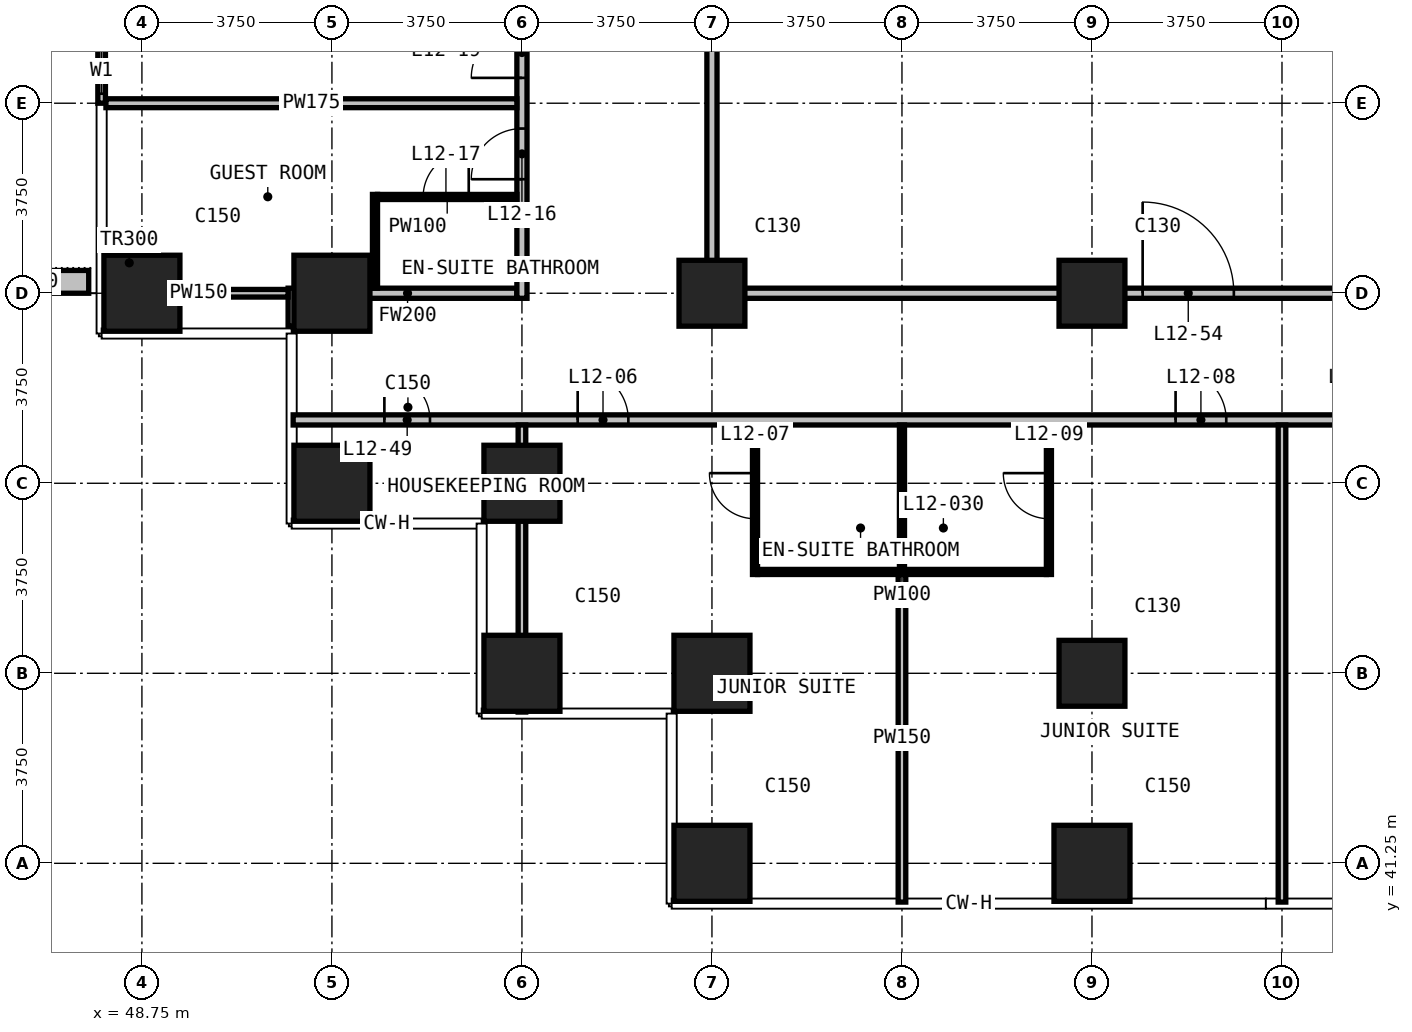
"""IFC4 building model, lengths in metres.
Left out: names, types, materials, properties, quantities, classifications, styles, units other than length and angle.
Written with IfcOpenShell. Run it as: python <this file> out.ifc"""

import sys

from ifc_helpers import new_model, si_unit, direction, frame, frame_2d, origin, origin_2d, place, context, subcontext, project, spatial, rectangle, extrude, element, fill, save


model = new_model("IFC4")
c1 = context("Model", 3, precision=1e-05, world=origin(), true_north=direction((0.0, 1.0)))
c2 = subcontext(c1, "Body", "Model", "MODEL_VIEW")
j1 = project(units=[si_unit("LENGTHUNIT", "METRE"), si_unit("PLANEANGLEUNIT", "RADIAN")], contexts=[c1])
p1 = place(None, origin())
s1 = spatial("IfcSite", under=j1, at=p1, CompositionType="ELEMENT")
p2 = place(p1, origin())
s2 = spatial("IfcBuilding", under=s1, at=p2, CompositionType="ELEMENT")
p3 = place(p2, frame((0.0, 0.0, 59.3)))
s3 = spatial("IfcBuildingStorey", under=s2, at=p3, CompositionType="ELEMENT", Elevation=59.3)
for number, where, z_axis, x_axis in (
    (1, (48.75, 52.5, 0.0), (0.0, 0.0, 1.0), (1.0, 0.0, 0.0)),
    (2, (52.5, 48.75, 0.0), (0.0, 0.0, 1.0), (1.0, 0.0, 0.0)),
    (3, (52.5, 52.5, 0.0), (0.0, 0.0, 1.0), (1.0, 0.0, 0.0)),
    (4, (56.25, 45.0, 0.0), (0.0, 0.0, 1.0), (1.0, 0.0, 0.0)),
    (5, (56.25, 48.75, 0.0), (0.0, 0.0, 1.0), (1.0, 0.0, 0.0)),
    (6, (60.0, 41.25, 0.0), (0.0, 0.0, 1.0), (1.0, 0.0, 0.0)),
    (7, (60.0, 45.0, 0.0), (0.0, 0.0, 1.0), (1.0, 0.0, 0.0)),
):
    element("IfcColumn", number, at=place(p3, frame(where, z_axis=z_axis, x_axis=x_axis)), inside=s3, PredefinedType="COLUMN", context=c2, shape_type="SweptSolid", body=[
        extrude(rectangle(XDim=1.5, YDim=1.5, at=origin_2d()), origin(), (0.0, 0.0, 1.0), 3.3),
    ])
p4 = place(p3, frame((60.0, 52.5, 0.0), z_axis=(0.0, 0.0, 1.0), x_axis=(1.0, 0.0, 0.0)))
e8 = element("IfcColumn", 8, at=p4, inside=s3, PredefinedType="COLUMN", context=c2, shape_type="SweptSolid", body=[
    extrude(rectangle(XDim=1.3, YDim=1.3, at=origin_2d()), origin(), (0.0, 0.0, 1.0), 3.3),
])
p5 = place(p3, frame((67.5, 41.25, 0.0), z_axis=(0.0, 0.0, 1.0), x_axis=(1.0, 0.0, 0.0)))
e9 = element("IfcColumn", 9, at=p5, inside=s3, PredefinedType="COLUMN", context=c2, shape_type="SweptSolid", body=[
    extrude(rectangle(XDim=1.5, YDim=1.5, at=origin_2d()), origin(), (0.0, 0.0, 1.0), 3.3),
])
for number, where, z_axis, x_axis in (
    (10, (67.5, 45.0, 0.0), (0.0, 0.0, 1.0), (1.0, 0.0, 0.0)),
    (11, (67.5, 52.5, 0.0), (0.0, 0.0, 1.0), (1.0, 0.0, 0.0)),
):
    element("IfcColumn", number, at=place(p3, frame(where, z_axis=z_axis, x_axis=x_axis)), inside=s3, PredefinedType="COLUMN", context=c2, shape_type="SweptSolid", body=[
        extrude(rectangle(XDim=1.3, YDim=1.3, at=origin_2d()), origin(), (0.0, 0.0, 1.0), 3.3),
    ])
p6 = place(p3, frame((47.955, 56.25, 0.0), z_axis=(0.0, 0.0, 1.0), x_axis=(0.0, 1.0, 0.0)))
e12 = element("IfcWall", 12, at=p6, inside=s3, PredefinedType="SOLIDWALL", context=c2, shape_type="SweptSolid", body=[
    extrude(rectangle(XDim=3.75, YDim=0.15, at=frame_2d((1.875, 0.0))), origin(), (0.0, 0.0, 1.0), 3.0),
])
p7 = place(p6, frame((0.188, 0.0, 0.1)))
e13 = element("IfcOpeningElement", 13, at=p7, cuts=e12, PredefinedType="OPENING", context=c2, shape_type="SweptSolid", body=[
    extrude(rectangle(XDim=0.9, YDim=2.4, at=frame_2d((0.45, 1.2))), frame((0.0, 0.085, 0.0), z_axis=(0.0, -1.0, 0.0), x_axis=(1.0, 0.0, 0.0)), (0.0, 0.0, 1.0), 0.17),
])
p8 = place(p6, frame((1.275, 0.0, 0.0)))
e14 = element("IfcOpeningElement", 14, at=p8, cuts=e12, PredefinedType="OPENING", context=c2, shape_type="SweptSolid", body=[
    extrude(rectangle(XDim=1.2, YDim=2.4, at=frame_2d((0.6, 1.2))), frame((0.0, 0.085, 0.0), z_axis=(0.0, -1.0, 0.0), x_axis=(1.0, 0.0, 0.0)), (0.0, 0.0, 1.0), 0.17),
])
p9 = place(p3, frame((47.7, 52.725, 0.0), z_axis=(0.0, 0.0, 1.0), x_axis=(-1.0, 0.0, 0.0)))
e15 = element("IfcWall", 15, at=p9, inside=s3, PredefinedType="USERDEFINED", context=c2, shape_type="SweptSolid", body=[
    extrude(rectangle(XDim=2.35, YDim=0.45, at=frame_2d((1.175, 0.0))), origin(), (0.0, 0.0, 1.0), 1.1),
])
p10 = place(p3, frame((51.735, 50.0, 0.0), z_axis=(0.0, 0.0, 1.0), x_axis=(1.0, 0.0, 0.0)))
e16 = element("IfcWall", 16, at=p10, inside=s3, PredefinedType="PARTITIONING", context=c2, shape_type="SweptSolid", body=[
    extrude(rectangle(XDim=46.53, YDim=0.2, at=frame_2d((23.265, 0.0))), origin(), (0.0, 0.0, 1.0), 3.0),
])
p11 = place(p10, frame((5.615, 0.0, 0.0)))
e17 = element("IfcOpeningElement", 17, at=p11, cuts=e16, PredefinedType="OPENING", context=c2, shape_type="SweptSolid", body=[
    extrude(rectangle(XDim=1.0, YDim=2.2, at=frame_2d((0.5, 1.1))), frame((0.0, 0.11, 0.0), z_axis=(0.0, -1.0, 0.0), x_axis=(1.0, 0.0, 0.0)), (0.0, 0.0, 1.0), 0.22),
])
p12 = place(p10, frame((17.415, 0.0, 0.0)))
e18 = element("IfcOpeningElement", 18, at=p12, cuts=e16, PredefinedType="OPENING", context=c2, shape_type="SweptSolid", body=[
    extrude(rectangle(XDim=1.0, YDim=2.2, at=frame_2d((0.5, 1.1))), frame((0.0, 0.11, 0.0), z_axis=(0.0, -1.0, 0.0), x_axis=(1.0, 0.0, 0.0)), (0.0, 0.0, 1.0), 0.22),
])
p13 = place(p10, frame((20.615, 0.0, 0.0)))
e19 = element("IfcOpeningElement", 19, at=p13, cuts=e16, PredefinedType="OPENING", context=c2, shape_type="SweptSolid", body=[
    extrude(rectangle(XDim=1.0, YDim=2.2, at=frame_2d((0.5, 1.1))), frame((0.0, 0.11, 0.0), z_axis=(0.0, -1.0, 0.0), x_axis=(1.0, 0.0, 0.0)), (0.0, 0.0, 1.0), 0.22),
])
p14 = place(p10, frame((32.415, 0.0, 0.0)))
e20 = element("IfcOpeningElement", 20, at=p14, cuts=e16, PredefinedType="OPENING", context=c2, shape_type="SweptSolid", body=[
    extrude(rectangle(XDim=1.0, YDim=2.2, at=frame_2d((0.5, 1.1))), frame((0.0, 0.11, 0.0), z_axis=(0.0, -1.0, 0.0), x_axis=(1.0, 0.0, 0.0)), (0.0, 0.0, 1.0), 0.22),
])
p15 = place(p10, frame((35.615, 0.0, 0.0)))
e21 = element("IfcOpeningElement", 21, at=p15, cuts=e16, PredefinedType="OPENING", context=c2, shape_type="SweptSolid", body=[
    extrude(rectangle(XDim=1.0, YDim=2.2, at=frame_2d((0.5, 1.1))), frame((0.0, 0.11, 0.0), z_axis=(0.0, -1.0, 0.0), x_axis=(1.0, 0.0, 0.0)), (0.0, 0.0, 1.0), 0.22),
])
p16 = place(p10, frame((1.8, 0.0, 0.0)))
e22 = element("IfcOpeningElement", 22, at=p16, cuts=e16, PredefinedType="OPENING", context=c2, shape_type="SweptSolid", body=[
    extrude(rectangle(XDim=0.9, YDim=2.2, at=frame_2d((0.45, 1.1))), frame((0.0, 0.11, 0.0), z_axis=(0.0, -1.0, 0.0), x_axis=(1.0, 0.0, 0.0)), (0.0, 0.0, 1.0), 0.22),
])
p17 = place(p10, frame((43.815, 0.0, 0.0)))
e23 = element("IfcOpeningElement", 23, at=p17, cuts=e16, PredefinedType="OPENING", context=c2, shape_type="SweptSolid", body=[
    extrude(rectangle(XDim=0.9, YDim=2.2, at=frame_2d((0.45, 1.1))), frame((0.0, 0.11, 0.0), z_axis=(0.0, -1.0, 0.0), x_axis=(1.0, 0.0, 0.0)), (0.0, 0.0, 1.0), 0.22),
])
p18 = place(p3, frame((51.835, 52.5, 0.0), z_axis=(0.0, 0.0, 1.0), x_axis=(1.0, 0.0, 0.0)))
e24 = element("IfcWall", 24, at=p18, inside=s3, PredefinedType="PARTITIONING", context=c2, shape_type="SweptSolid", body=[
    extrude(rectangle(XDim=4.315, YDim=0.2, at=frame_2d((2.157, 0.0))), origin(), (0.0, 0.0, 1.0), 3.0),
])
p19 = place(p3, frame((60.1, 52.5, 0.0), z_axis=(0.0, 0.0, 1.0), x_axis=(1.0, 0.0, 0.0)))
e25 = element("IfcWall", 25, at=p19, inside=s3, PredefinedType="PARTITIONING", context=c2, shape_type="SweptSolid", body=[
    extrude(rectangle(XDim=29.8, YDim=0.2, at=frame_2d((14.9, 0.0))), origin(), (0.0, 0.0, 1.0), 3.0),
])
p20 = place(p19, frame((8.4, 0.0, 0.0)))
e26 = element("IfcOpeningElement", 26, at=p20, cuts=e25, PredefinedType="OPENING", context=c2, shape_type="SweptSolid", body=[
    extrude(rectangle(XDim=1.8, YDim=2.2, at=frame_2d((0.9, 1.1))), frame((0.0, 0.11, 0.0), z_axis=(0.0, -1.0, 0.0), x_axis=(1.0, 0.0, 0.0)), (0.0, 0.0, 1.0), 0.22),
])
p21 = place(p19, frame((23.75, 0.0, 0.0)))
e27 = element("IfcOpeningElement", 27, at=p21, cuts=e25, PredefinedType="OPENING", context=c2, shape_type="SweptSolid", body=[
    extrude(rectangle(XDim=0.9, YDim=2.2, at=frame_2d((0.45, 1.1))), frame((0.0, 0.11, 0.0), z_axis=(0.0, -1.0, 0.0), x_axis=(1.0, 0.0, 0.0)), (0.0, 0.0, 1.0), 0.22),
])
p22 = place(p3, frame((51.735, 51.855, 0.0), z_axis=(0.0, 0.0, 1.0), x_axis=(0.0, 1.0, 0.0)))
e28 = element("IfcWall", 28, at=p22, inside=s3, PredefinedType="PARTITIONING", context=c2, shape_type="SweptSolid", body=[
    extrude(rectangle(XDim=0.745, YDim=0.2, at=frame_2d((0.373, 0.0))), origin(), (0.0, 0.0, 1.0), 3.0),
])
p23 = place(p3, frame((56.25, 52.4, 0.0), z_axis=(0.0, 0.0, 1.0), x_axis=(0.0, 1.0, 0.0)))
e29 = element("IfcWall", 29, at=p23, inside=s3, PredefinedType="PARTITIONING", context=c2, shape_type="SweptSolid", body=[
    extrude(rectangle(XDim=38.31, YDim=0.2, at=frame_2d((19.155, 0.0))), origin(), (0.0, 0.0, 1.0), 3.0),
])
p24 = place(p23, frame((2.35, 0.0, 0.0)))
e30 = element("IfcOpeningElement", 30, at=p24, cuts=e29, PredefinedType="OPENING", context=c2, shape_type="SweptSolid", body=[
    extrude(rectangle(XDim=1.0, YDim=2.2, at=frame_2d((0.5, 1.1))), frame((0.0, 0.11, 0.0), z_axis=(0.0, -1.0, 0.0), x_axis=(1.0, 0.0, 0.0)), (0.0, 0.0, 1.0), 0.22),
])
p25 = place(p23, frame((4.35, 0.0, 0.0)))
e31 = element("IfcOpeningElement", 31, at=p25, cuts=e29, PredefinedType="OPENING", context=c2, shape_type="SweptSolid", body=[
    extrude(rectangle(XDim=1.0, YDim=2.2, at=frame_2d((0.5, 1.1))), frame((0.0, 0.11, 0.0), z_axis=(0.0, -1.0, 0.0), x_axis=(1.0, 0.0, 0.0)), (0.0, 0.0, 1.0), 0.22),
])
p26 = place(p23, frame((13.0, 0.0, 0.0)))
e32 = element("IfcOpeningElement", 32, at=p26, cuts=e29, PredefinedType="OPENING", context=c2, shape_type="SweptSolid", body=[
    extrude(rectangle(XDim=1.0, YDim=2.2, at=frame_2d((0.5, 1.1))), frame((0.0, 0.11, 0.0), z_axis=(0.0, -1.0, 0.0), x_axis=(1.0, 0.0, 0.0)), (0.0, 0.0, 1.0), 0.22),
])
p27 = place(p23, frame((15.6, 0.0, 0.0)))
e33 = element("IfcOpeningElement", 33, at=p27, cuts=e29, PredefinedType="OPENING", context=c2, shape_type="SweptSolid", body=[
    extrude(rectangle(XDim=1.0, YDim=2.2, at=frame_2d((0.5, 1.1))), frame((0.0, 0.11, 0.0), z_axis=(0.0, -1.0, 0.0), x_axis=(1.0, 0.0, 0.0)), (0.0, 0.0, 1.0), 0.22),
])
p28 = place(p23, frame((21.1, 0.0, 0.0)))
e34 = element("IfcOpeningElement", 34, at=p28, cuts=e29, PredefinedType="OPENING", context=c2, shape_type="SweptSolid", body=[
    extrude(rectangle(XDim=1.0, YDim=2.2, at=frame_2d((0.5, 1.1))), frame((0.0, 0.11, 0.0), z_axis=(0.0, -1.0, 0.0), x_axis=(1.0, 0.0, 0.0)), (0.0, 0.0, 1.0), 0.22),
])
p29 = place(p23, frame((23.7, 0.0, 0.0)))
e35 = element("IfcOpeningElement", 35, at=p29, cuts=e29, PredefinedType="OPENING", context=c2, shape_type="SweptSolid", body=[
    extrude(rectangle(XDim=1.0, YDim=2.2, at=frame_2d((0.5, 1.1))), frame((0.0, 0.11, 0.0), z_axis=(0.0, -1.0, 0.0), x_axis=(1.0, 0.0, 0.0)), (0.0, 0.0, 1.0), 0.22),
])
p30 = place(p23, frame((31.55, 0.0, 0.0)))
e36 = element("IfcOpeningElement", 36, at=p30, cuts=e29, PredefinedType="OPENING", context=c2, shape_type="SweptSolid", body=[
    extrude(rectangle(XDim=0.9, YDim=2.2, at=frame_2d((0.45, 1.1))), frame((0.0, 0.11, 0.0), z_axis=(0.0, -1.0, 0.0), x_axis=(1.0, 0.0, 0.0)), (0.0, 0.0, 1.0), 0.22),
])
p31 = place(p23, frame((35.65, 0.0, 0.0)))
e37 = element("IfcOpeningElement", 37, at=p31, cuts=e29, PredefinedType="OPENING", context=c2, shape_type="SweptSolid", body=[
    extrude(rectangle(XDim=0.9, YDim=2.2, at=frame_2d((0.45, 1.1))), frame((0.0, 0.11, 0.0), z_axis=(0.0, -1.0, 0.0), x_axis=(1.0, 0.0, 0.0)), (0.0, 0.0, 1.0), 0.22),
])
p32 = place(p3, frame((60.0, 52.4, 0.0), z_axis=(0.0, 0.0, 1.0), x_axis=(0.0, 1.0, 0.0)))
e38 = element("IfcWall", 38, at=p32, inside=s3, PredefinedType="PARTITIONING", context=c2, shape_type="SweptSolid", body=[
    extrude(rectangle(XDim=18.84, YDim=0.2, at=frame_2d((9.42, 0.0))), origin(), (0.0, 0.0, 1.0), 3.0),
])
p33 = place(p32, frame((13.45, 0.0, 0.0)))
e39 = element("IfcOpeningElement", 39, at=p33, cuts=e38, PredefinedType="OPENING", context=c2, shape_type="SweptSolid", body=[
    extrude(rectangle(XDim=1.0, YDim=2.2, at=frame_2d((0.5, 1.1))), frame((0.0, 0.11, 0.0), z_axis=(0.0, -1.0, 0.0), x_axis=(1.0, 0.0, 0.0)), (0.0, 0.0, 1.0), 0.22),
])
p34 = place(p3, frame((48.04, 56.25, 0.0), z_axis=(0.0, 0.0, 1.0), x_axis=(1.0, 0.0, 0.0)))
e40 = element("IfcWall", 40, at=p34, inside=s3, PredefinedType="PARTITIONING", context=c2, shape_type="SweptSolid", body=[
    extrude(rectangle(XDim=8.11, YDim=0.175, at=frame_2d((4.055, 0.0))), origin(), (0.0, 0.0, 1.0), 3.0),
])
p35 = place(p3, frame((48.105, 52.5, 0.0), z_axis=(0.0, 0.0, 1.0), x_axis=(1.0, 0.0, 0.0)))
e41 = element("IfcWall", 41, at=p35, inside=s3, PredefinedType="PARTITIONING", context=c2, shape_type="SweptSolid", body=[
    extrude(rectangle(XDim=3.53, YDim=0.15, at=frame_2d((1.765, 0.0))), origin(), (0.0, 0.0, 1.0), 3.0),
])
p36 = place(p3, frame((56.25, 44.235, 0.0), z_axis=(0.0, 0.0, 1.0), x_axis=(0.0, 1.0, 0.0)))
e42 = element("IfcWall", 42, at=p36, inside=s3, PredefinedType="PARTITIONING", context=c2, shape_type="SweptSolid", body=[
    extrude(rectangle(XDim=5.665, YDim=0.15, at=frame_2d((2.833, 0.0))), origin(), (0.0, 0.0, 1.0), 3.0),
])
p37 = place(p3, frame((63.75, 40.485, 0.0), z_axis=(0.0, 0.0, 1.0), x_axis=(0.0, 1.0, 0.0)))
e43 = element("IfcWall", 43, at=p37, inside=s3, PredefinedType="PARTITIONING", context=c2, shape_type="SweptSolid", body=[
    extrude(rectangle(XDim=6.465, YDim=0.15, at=frame_2d((3.232, 0.0))), origin(), (0.0, 0.0, 1.0), 3.0),
])
p38 = place(p3, frame((71.25, 40.485, 0.0), z_axis=(0.0, 0.0, 1.0), x_axis=(0.0, 1.0, 0.0)))
e44 = element("IfcWall", 44, at=p38, inside=s3, PredefinedType="PARTITIONING", context=c2, shape_type="SweptSolid", body=[
    extrude(rectangle(XDim=9.415, YDim=0.15, at=frame_2d((4.708, 0.0))), origin(), (0.0, 0.0, 1.0), 3.0),
])
p39 = place(p3, frame((60.9, 47.0, 0.0), z_axis=(0.0, 0.0, 1.0), x_axis=(1.0, 0.0, 0.0)))
e45 = element("IfcWall", 45, at=p39, inside=s3, PredefinedType="PARTITIONING", context=c2, shape_type="SweptSolid", body=[
    extrude(rectangle(XDim=5.7, YDim=0.1, at=frame_2d((2.85, 0.0))), origin(), (0.0, 0.0, 1.0), 3.0),
])
p40 = place(p3, frame((53.4, 54.4, 0.0), z_axis=(0.0, 0.0, 1.0), x_axis=(1.0, 0.0, 0.0)))
e46 = element("IfcWall", 46, at=p40, inside=s3, PredefinedType="PARTITIONING", context=c2, shape_type="SweptSolid", body=[
    extrude(rectangle(XDim=2.75, YDim=0.1, at=frame_2d((1.375, 0.0))), origin(), (0.0, 0.0, 1.0), 3.0),
])
p41 = place(p40, frame((0.9, 0.0, 0.0)))
e47 = element("IfcOpeningElement", 47, at=p41, cuts=e46, PredefinedType="OPENING", context=c2, shape_type="SweptSolid", body=[
    extrude(rectangle(XDim=0.9, YDim=2.2, at=frame_2d((0.45, 1.1))), frame((0.0, 0.06, 0.0), z_axis=(0.0, -1.0, 0.0), x_axis=(1.0, 0.0, 0.0)), (0.0, 0.0, 1.0), 0.12),
])
p42 = place(p3, frame((53.35, 52.6, 0.0), z_axis=(0.0, 0.0, 1.0), x_axis=(0.0, 1.0, 0.0)))
e48 = element("IfcWall", 48, at=p42, inside=s3, PredefinedType="PARTITIONING", context=c2, shape_type="SweptSolid", body=[
    extrude(rectangle(XDim=1.85, YDim=0.1, at=frame_2d((0.925, 0.0))), origin(), (0.0, 0.0, 1.0), 3.0),
])
p43 = place(p3, frame((60.85, 46.95, 0.0), z_axis=(0.0, 0.0, 1.0), x_axis=(0.0, 1.0, 0.0)))
e49 = element("IfcWall", 49, at=p43, inside=s3, PredefinedType="PARTITIONING", context=c2, shape_type="SweptSolid", body=[
    extrude(rectangle(XDim=2.95, YDim=0.1, at=frame_2d((1.475, 0.0))), origin(), (0.0, 0.0, 1.0), 3.0),
])
p44 = place(p43, frame((1.1, 0.0, 0.0)))
e50 = element("IfcOpeningElement", 50, at=p44, cuts=e49, PredefinedType="OPENING", context=c2, shape_type="SweptSolid", body=[
    extrude(rectangle(XDim=0.9, YDim=2.2, at=frame_2d((0.45, 1.1))), frame((0.0, 0.06, 0.0), z_axis=(0.0, -1.0, 0.0), x_axis=(1.0, 0.0, 0.0)), (0.0, 0.0, 1.0), 0.12),
])
p45 = place(p3, frame((63.75, 47.05, 0.0), z_axis=(0.0, 0.0, 1.0), x_axis=(0.0, 1.0, 0.0)))
e51 = element("IfcWall", 51, at=p45, inside=s3, PredefinedType="PARTITIONING", context=c2, shape_type="SweptSolid", body=[
    extrude(rectangle(XDim=2.85, YDim=0.1, at=frame_2d((1.425, 0.0))), origin(), (0.0, 0.0, 1.0), 3.0),
])
p46 = place(p3, frame((66.65, 46.95, 0.0), z_axis=(0.0, 0.0, 1.0), x_axis=(0.0, 1.0, 0.0)))
e52 = element("IfcWall", 52, at=p46, inside=s3, PredefinedType="PARTITIONING", context=c2, shape_type="SweptSolid", body=[
    extrude(rectangle(XDim=2.95, YDim=0.1, at=frame_2d((1.475, 0.0))), origin(), (0.0, 0.0, 1.0), 3.0),
])
p47 = place(p46, frame((1.1, 0.0, 0.0)))
e53 = element("IfcOpeningElement", 53, at=p47, cuts=e52, PredefinedType="OPENING", context=c2, shape_type="SweptSolid", body=[
    extrude(rectangle(XDim=0.9, YDim=2.2, at=frame_2d((0.45, 1.1))), frame((0.0, 0.06, 0.0), z_axis=(0.0, -1.0, 0.0), x_axis=(1.0, 0.0, 0.0)), (0.0, 0.0, 1.0), 0.12),
])
p48 = place(p7, origin())
e54 = element("IfcWindow", 54, at=p48, inside=s3, PartitioningType="SINGLE_PANEL", PredefinedType="WINDOW", context=c2, shape_type="SweptSolid", body=[
    extrude(rectangle(XDim=0.9, YDim=2.4, at=frame_2d((0.45, 1.2))), frame((0.0, 0.03, 0.0), z_axis=(0.0, -1.0, 0.0), x_axis=(1.0, 0.0, 0.0)), (0.0, 0.0, 1.0), 0.06),
])
fill(e13, e54)
p49 = place(p11, origin())
e55 = element("IfcDoor", 55, at=p49, inside=s3, OperationType="SINGLE_SWING_LEFT", PredefinedType="DOOR", context=c2, shape_type="SweptSolid", body=[
    extrude(rectangle(XDim=1.0, YDim=2.2, at=frame_2d((0.5, 1.1))), frame((0.0, 0.025, 0.0), z_axis=(0.0, -1.0, 0.0), x_axis=(1.0, 0.0, 0.0)), (0.0, 0.0, 1.0), 0.05),
])
fill(e17, e55)
p50 = place(p44, origin())
e56 = element("IfcDoor", 56, at=p50, inside=s3, OperationType="SINGLE_SWING_RIGHT", PredefinedType="DOOR", context=c2, shape_type="SweptSolid", body=[
    extrude(rectangle(XDim=0.9, YDim=2.2, at=frame_2d((0.45, 1.1))), frame((0.0, 0.025, 0.0), z_axis=(0.0, -1.0, 0.0), x_axis=(1.0, 0.0, 0.0)), (0.0, 0.0, 1.0), 0.05),
])
fill(e50, e56)
p51 = place(p12, origin())
e57 = element("IfcDoor", 57, at=p51, inside=s3, OperationType="SINGLE_SWING_LEFT", PredefinedType="DOOR", context=c2, shape_type="SweptSolid", body=[
    extrude(rectangle(XDim=1.0, YDim=2.2, at=frame_2d((0.5, 1.1))), frame((0.0, 0.025, 0.0), z_axis=(0.0, -1.0, 0.0), x_axis=(1.0, 0.0, 0.0)), (0.0, 0.0, 1.0), 0.05),
])
fill(e18, e57)
p52 = place(p47, origin())
e58 = element("IfcDoor", 58, at=p52, inside=s3, OperationType="SINGLE_SWING_RIGHT", PredefinedType="DOOR", context=c2, shape_type="SweptSolid", body=[
    extrude(rectangle(XDim=0.9, YDim=2.2, at=frame_2d((0.45, 1.1))), frame((0.0, 0.025, 0.0), z_axis=(0.0, -1.0, 0.0), x_axis=(1.0, 0.0, 0.0)), (0.0, 0.0, 1.0), 0.05),
])
fill(e53, e58)
p53 = place(p24, origin())
e59 = element("IfcDoor", 59, at=p53, inside=s3, OperationType="SINGLE_SWING_LEFT", PredefinedType="DOOR", context=c2, shape_type="SweptSolid", body=[
    extrude(rectangle(XDim=1.0, YDim=2.2, at=frame_2d((0.5, 1.1))), frame((0.0, 0.025, 0.0), z_axis=(0.0, -1.0, 0.0), x_axis=(1.0, 0.0, 0.0)), (0.0, 0.0, 1.0), 0.05),
])
fill(e30, e59)
p54 = place(p41, origin())
e60 = element("IfcDoor", 60, at=p54, inside=s3, OperationType="SINGLE_SWING_RIGHT", PredefinedType="DOOR", context=c2, shape_type="SweptSolid", body=[
    extrude(rectangle(XDim=0.9, YDim=2.2, at=frame_2d((0.45, 1.1))), frame((0.0, 0.025, 0.0), z_axis=(0.0, -1.0, 0.0), x_axis=(1.0, 0.0, 0.0)), (0.0, 0.0, 1.0), 0.05),
])
fill(e47, e60)
p55 = place(p25, origin())
e61 = element("IfcDoor", 61, at=p55, inside=s3, OperationType="SINGLE_SWING_LEFT", PredefinedType="DOOR", context=c2, shape_type="SweptSolid", body=[
    extrude(rectangle(XDim=1.0, YDim=2.2, at=frame_2d((0.5, 1.1))), frame((0.0, 0.025, 0.0), z_axis=(0.0, -1.0, 0.0), x_axis=(1.0, 0.0, 0.0)), (0.0, 0.0, 1.0), 0.05),
])
fill(e31, e61)
p56 = place(p16, origin())
e62 = element("IfcDoor", 62, at=p56, inside=s3, OperationType="SINGLE_SWING_RIGHT", PredefinedType="DOOR", context=c2, shape_type="SweptSolid", body=[
    extrude(rectangle(XDim=0.9, YDim=2.2, at=frame_2d((0.45, 1.1))), frame((0.0, 0.025, 0.0), z_axis=(0.0, -1.0, 0.0), x_axis=(1.0, 0.0, 0.0)), (0.0, 0.0, 1.0), 0.05),
])
fill(e22, e62)
p57 = place(p20, origin())
e63 = element("IfcDoor", 63, at=p57, inside=s3, OperationType="DOUBLE_DOOR_SINGLE_SWING", PredefinedType="DOOR", context=c2, shape_type="SweptSolid", body=[
    extrude(rectangle(XDim=1.8, YDim=2.2, at=frame_2d((0.9, 1.1))), frame((0.0, 0.025, 0.0), z_axis=(0.0, -1.0, 0.0), x_axis=(1.0, 0.0, 0.0)), (0.0, 0.0, 1.0), 0.05),
])
fill(e26, e63)
save(model, sys.argv[1])
